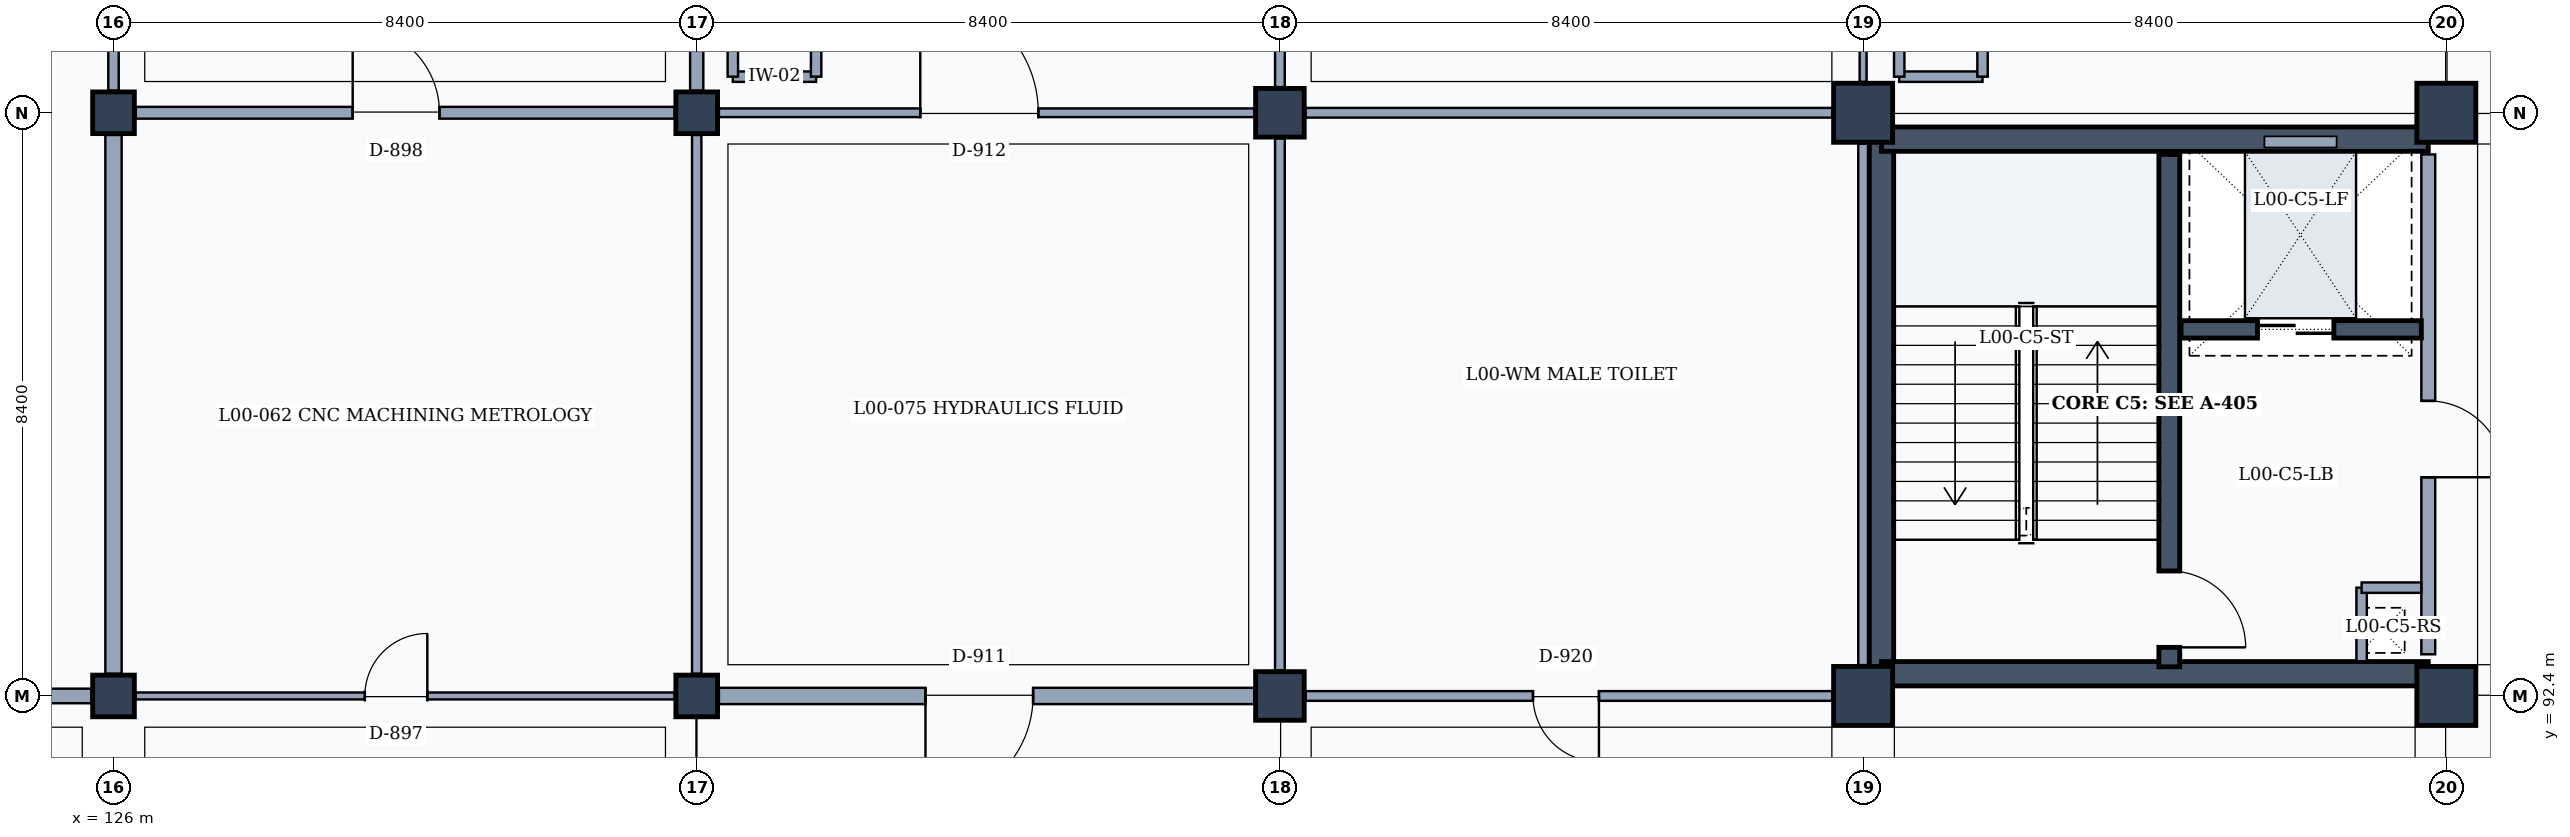
"""IFC4 building model, lengths in metres.
Left out: names, types, materials, properties, quantities, classifications, styles, units other than length and angle.
Written with IfcOpenShell. Run it as: python <this file> out.ifc"""

import sys

from ifc_helpers import new_model, si_unit, direction, frame, frame_2d, origin, origin_2d, place, context, subcontext, project, spatial, rectangle, extrude, element, fill, save


model = new_model("IFC4")
c1 = context("Model", 3, precision=1e-05, world=origin(), true_north=direction((0.0, 1.0)))
c2 = subcontext(c1, "Body", "Model", "MODEL_VIEW")
j1 = project(units=[si_unit("LENGTHUNIT", "METRE"), si_unit("PLANEANGLEUNIT", "RADIAN")], contexts=[c1])
p1 = place(None, origin())
s1 = spatial("IfcSite", under=j1, at=p1, CompositionType="ELEMENT")
p2 = place(p1, origin())
s2 = spatial("IfcBuilding", under=s1, at=p2, CompositionType="ELEMENT")
p3 = place(p2, origin())
s3 = spatial("IfcBuildingStorey", under=s2, at=p3, CompositionType="ELEMENT", Elevation=0.0)
for number, where, z_axis, x_axis in (
    (1, (126.0, 92.4, 0.0), (0.0, 0.0, 1.0), (1.0, 0.0, 0.0)),
    (2, (126.0, 100.8, 0.0), (0.0, 0.0, 1.0), (1.0, 0.0, 0.0)),
    (3, (134.4, 92.4, 0.0), (0.0, 0.0, 1.0), (1.0, 0.0, 0.0)),
    (4, (134.4, 100.8, 0.0), (0.0, 0.0, 1.0), (1.0, 0.0, 0.0)),
):
    element("IfcColumn", number, at=place(p3, frame(where, z_axis=z_axis, x_axis=x_axis)), inside=s3, PredefinedType="COLUMN", context=c2, shape_type="SweptSolid", body=[
        extrude(rectangle(XDim=0.6, YDim=0.6, at=origin_2d()), origin(), (0.0, 0.0, 1.0), 4.8),
    ])
for number, where, z_axis, x_axis in (
    (5, (142.8, 92.4, 0.0), (0.0, 0.0, 1.0), (1.0, 0.0, 0.0)),
    (6, (142.8, 100.8, 0.0), (0.0, 0.0, 1.0), (1.0, 0.0, 0.0)),
):
    element("IfcColumn", number, at=place(p3, frame(where, z_axis=z_axis, x_axis=x_axis)), inside=s3, PredefinedType="COLUMN", context=c2, shape_type="SweptSolid", body=[
        extrude(rectangle(XDim=0.7, YDim=0.7, at=origin_2d()), origin(), (0.0, 0.0, 1.0), 4.8),
    ])
for number, where, z_axis, x_axis in (
    (7, (151.2, 92.4, 0.0), (0.0, 0.0, 1.0), (1.0, 0.0, 0.0)),
    (8, (151.2, 100.8, 0.0), (0.0, 0.0, 1.0), (1.0, 0.0, 0.0)),
    (9, (159.6, 92.4, 0.0), (0.0, 0.0, 1.0), (1.0, 0.0, 0.0)),
    (10, (159.6, 100.8, 0.0), (0.0, 0.0, 1.0), (1.0, 0.0, 0.0)),
):
    element("IfcColumn", number, at=place(p3, frame(where, z_axis=z_axis, x_axis=x_axis)), inside=s3, PredefinedType="COLUMN", context=c2, shape_type="SweptSolid", body=[
        extrude(rectangle(XDim=0.85, YDim=0.85, at=origin_2d()), origin(), (0.0, 0.0, 1.0), 4.8),
    ])
p4 = place(p3, frame((151.465, 92.65, 0.0), z_axis=(0.0, 0.0, 1.0), x_axis=(0.0, 1.0, 0.0)))
e11 = element("IfcWall", 11, at=p4, inside=s3, PredefinedType="SHEAR", context=c2, shape_type="SweptSolid", body=[
    extrude(rectangle(XDim=7.94, YDim=0.35, at=frame_2d((3.97, 0.0))), origin(), (0.0, 0.0, 1.0), 4.55),
])
p5 = place(p3, frame((151.465, 100.42, 0.0), z_axis=(0.0, 0.0, 1.0), x_axis=(1.0, 0.0, 0.0)))
e12 = element("IfcWall", 12, at=p5, inside=s3, PredefinedType="SHEAR", context=c2, shape_type="SweptSolid", body=[
    extrude(rectangle(XDim=7.875, YDim=0.35, at=frame_2d((3.938, 0.0))), origin(), (0.0, 0.0, 1.0), 4.55),
])
p6 = place(p3, frame((159.34, 100.2, 0.0), z_axis=(0.0, 0.0, 1.0), x_axis=(0.0, -1.0, 0.0)))
e13 = element("IfcWall", 13, at=p6, inside=s3, PredefinedType="PARTITIONING", context=c2, shape_type="SweptSolid", body=[
    extrude(rectangle(XDim=7.2, YDim=0.2, at=frame_2d((3.6, 0.0))), origin(), (0.0, 0.0, 1.0), 3.92),
])
p7 = place(p6, frame((3.55, 0.0, 0.0)))
e14 = element("IfcOpeningElement", 14, at=p7, cuts=e13, PredefinedType="OPENING", context=c2, shape_type="SweptSolid", body=[
    extrude(rectangle(XDim=1.1, YDim=2.15, at=frame_2d((0.55, 1.075))), frame((0.0, 0.11, 0.0), z_axis=(0.0, -1.0, 0.0), x_axis=(1.0, 0.0, 0.0)), (0.0, 0.0, 1.0), 0.22),
])
p8 = place(p3, frame((159.34, 92.72, 0.0), z_axis=(0.0, 0.0, 1.0), x_axis=(-1.0, 0.0, 0.0)))
e15 = element("IfcWall", 15, at=p8, inside=s3, PredefinedType="SHEAR", context=c2, shape_type="SweptSolid", body=[
    extrude(rectangle(XDim=7.875, YDim=0.35, at=frame_2d((3.938, 0.0))), origin(), (0.0, 0.0, 1.0), 4.55),
])
p9 = place(p3, frame((155.61, 92.82, 0.0), z_axis=(0.0, 0.0, 1.0), x_axis=(0.0, 1.0, 0.0)))
e16 = element("IfcWall", 16, at=p9, inside=s3, PredefinedType="SHEAR", context=c2, shape_type="SweptSolid", body=[
    extrude(rectangle(XDim=7.38, YDim=0.3, at=frame_2d((3.69, 0.0))), origin(), (0.0, 0.0, 1.0), 4.55),
])
p10 = place(p9, frame((0.28, 0.0, 0.0)))
e17 = element("IfcOpeningElement", 17, at=p10, cuts=e16, PredefinedType="OPENING", context=c2, shape_type="SweptSolid", body=[
    extrude(rectangle(XDim=1.1, YDim=2.15, at=frame_2d((0.55, 1.075))), frame((0.0, 0.16, 0.0), z_axis=(0.0, -1.0, 0.0), x_axis=(1.0, 0.0, 0.0)), (0.0, 0.0, 1.0), 0.32),
])
p11 = place(p3, frame((158.38, 93.96, 0.0), z_axis=(0.0, 0.0, 1.0), x_axis=(0.0, -1.0, 0.0)))
e18 = element("IfcWall", 18, at=p11, inside=s3, PredefinedType="PARTITIONING", context=c2, shape_type="SweptSolid", body=[
    extrude(rectangle(XDim=1.06, YDim=0.15, at=frame_2d((0.53, 0.0))), origin(), (0.0, 0.0, 1.0), 3.92),
])
p12 = place(p3, frame((158.38, 93.96, 0.0), z_axis=(0.0, 0.0, 1.0), x_axis=(1.0, 0.0, 0.0)))
e19 = element("IfcWall", 19, at=p12, inside=s3, PredefinedType="PARTITIONING", context=c2, shape_type="SweptSolid", body=[
    extrude(rectangle(XDim=0.86, YDim=0.15, at=frame_2d((0.43, 0.0))), origin(), (0.0, 0.0, 1.0), 3.92),
])
p13 = place(p3, frame((155.78, 97.68, 0.0), z_axis=(0.0, 0.0, 1.0), x_axis=(1.0, 0.0, 0.0)))
e20 = element("IfcWall", 20, at=p13, inside=s3, PredefinedType="SHEAR", context=c2, shape_type="SweptSolid", body=[
    extrude(rectangle(XDim=3.46, YDim=0.25, at=frame_2d((1.73, 0.0))), origin(), (0.0, 0.0, 1.0), 4.55),
])
p14 = place(p13, frame((1.1, 0.0, 0.0)))
e21 = element("IfcOpeningElement", 21, at=p14, cuts=e20, PredefinedType="OPENING", context=c2, shape_type="SweptSolid", body=[
    extrude(rectangle(XDim=1.1, YDim=2.15, at=frame_2d((0.55, 1.075))), frame((0.0, 0.135, 0.0), z_axis=(0.0, -1.0, 0.0), x_axis=(1.0, 0.0, 0.0)), (0.0, 0.0, 1.0), 0.27),
])
p15 = place(p3, frame((134.92, 101.32, 0.0), z_axis=(0.0, 0.0, 1.0), x_axis=(1.0, 0.0, 0.0)))
e22 = element("IfcWall", 22, at=p15, inside=s3, PredefinedType="PARTITIONING", context=c2, shape_type="SweptSolid", body=[
    extrude(rectangle(XDim=1.2, YDim=0.15, at=frame_2d((0.6, 0.0))), origin(), (0.0, 0.0, 1.0), 4.55),
])
for number, where, z_axis, x_axis in (
    (23, (136.12, 101.32, 0.0), (0.0, 0.0, 1.0), (0.0, 1.0, 0.0)),
    (24, (134.92, 102.52, 0.0), (0.0, 0.0, 1.0), (0.0, -1.0, 0.0)),
    (25, (151.72, 101.32, 0.0), (0.0, 0.0, 1.0), (1.0, 0.0, 0.0)),
    (26, (152.92, 101.32, 0.0), (0.0, 0.0, 1.0), (0.0, 1.0, 0.0)),
    (27, (151.72, 102.52, 0.0), (0.0, 0.0, 1.0), (0.0, -1.0, 0.0)),
):
    element("IfcWall", number, at=place(p3, frame(where, z_axis=z_axis, x_axis=x_axis)), inside=s3, PredefinedType="PARTITIONING", context=c2, shape_type="SweptSolid", body=[
        extrude(rectangle(XDim=1.2, YDim=0.15, at=frame_2d((0.6, 0.0))), origin(), (0.0, 0.0, 1.0), 4.55),
    ])
p16 = place(p3, frame((117.92, 92.4, 0.0), z_axis=(0.0, 0.0, 1.0), x_axis=(1.0, 0.0, 0.0)))
e28 = element("IfcWall", 28, at=p16, inside=s3, PredefinedType="PARTITIONING", context=c2, shape_type="SweptSolid", body=[
    extrude(rectangle(XDim=7.76, YDim=0.21, at=frame_2d((3.88, 0.0))), origin(), (0.0, 0.0, 1.0), 3.92),
])
p17 = place(p16, frame((2.85, 0.0, 0.0)))
e29 = element("IfcOpeningElement", 29, at=p17, cuts=e28, PredefinedType="OPENING", context=c2, shape_type="SweptSolid", body=[
    extrude(rectangle(XDim=1.8, YDim=2.3, at=frame_2d((0.9, 1.15))), frame((0.0, 0.115, 0.0), z_axis=(0.0, -1.0, 0.0), x_axis=(1.0, 0.0, 0.0)), (0.0, 0.0, 1.0), 0.23),
])
p18 = place(p3, frame((126.0, 92.72, 0.0), z_axis=(0.0, 0.0, 1.0), x_axis=(0.0, 1.0, 0.0)))
e30 = element("IfcWall", 30, at=p18, inside=s3, PredefinedType="PARTITIONING", context=c2, shape_type="SweptSolid", body=[
    extrude(rectangle(XDim=7.76, YDim=0.235, at=frame_2d((3.88, 0.0))), origin(), (0.0, 0.0, 1.0), 3.92),
])
p19 = place(p3, frame((126.0, 101.12, 0.0), z_axis=(0.0, 0.0, 1.0), x_axis=(0.0, 1.0, 0.0)))
e31 = element("IfcWall", 31, at=p19, inside=s3, PredefinedType="PARTITIONING", context=c2, shape_type="SweptSolid", body=[
    extrude(rectangle(XDim=7.76, YDim=0.15, at=frame_2d((3.88, 0.0))), origin(), (0.0, 0.0, 1.0), 3.92),
])
p20 = place(p3, frame((126.32, 92.4, 0.0), z_axis=(0.0, 0.0, 1.0), x_axis=(1.0, 0.0, 0.0)))
e32 = element("IfcWall", 32, at=p20, inside=s3, PredefinedType="MOVABLE", context=c2, shape_type="SweptSolid", body=[
    extrude(rectangle(XDim=7.76, YDim=0.1, at=frame_2d((3.88, 0.0))), origin(), (0.0, 0.0, 1.0), 3.92),
])
p21 = place(p20, frame((3.3, 0.0, 0.0)))
e33 = element("IfcOpeningElement", 33, at=p21, cuts=e32, PredefinedType="OPENING", context=c2, shape_type="SweptSolid", body=[
    extrude(rectangle(XDim=0.9, YDim=2.1, at=frame_2d((0.45, 1.05))), frame((0.0, 0.06, 0.0), z_axis=(0.0, -1.0, 0.0), x_axis=(1.0, 0.0, 0.0)), (0.0, 0.0, 1.0), 0.12),
])
p22 = place(p3, frame((134.4, 92.72, 0.0), z_axis=(0.0, 0.0, 1.0), x_axis=(0.0, 1.0, 0.0)))
e34 = element("IfcWall", 34, at=p22, inside=s3, PredefinedType="PARTITIONING", context=c2, shape_type="SweptSolid", body=[
    extrude(rectangle(XDim=7.76, YDim=0.135, at=frame_2d((3.88, 0.0))), origin(), (0.0, 0.0, 1.0), 3.92),
])
p23 = place(p3, frame((126.32, 100.8, 0.0), z_axis=(0.0, 0.0, 1.0), x_axis=(1.0, 0.0, 0.0)))
e35 = element("IfcWall", 35, at=p23, inside=s3, PredefinedType="PARTITIONING", context=c2, shape_type="SweptSolid", body=[
    extrude(rectangle(XDim=7.76, YDim=0.17, at=frame_2d((3.88, 0.0))), origin(), (0.0, 0.0, 1.0), 3.92),
])
p24 = place(p23, frame((3.125, 0.0, 0.0)))
e36 = element("IfcOpeningElement", 36, at=p24, cuts=e35, PredefinedType="OPENING", context=c2, shape_type="SweptSolid", body=[
    extrude(rectangle(XDim=1.25, YDim=2.3, at=frame_2d((0.625, 1.15))), frame((0.0, 0.095, 0.0), z_axis=(0.0, -1.0, 0.0), x_axis=(1.0, 0.0, 0.0)), (0.0, 0.0, 1.0), 0.19),
])
p25 = place(p3, frame((134.4, 101.12, 0.0), z_axis=(0.0, 0.0, 1.0), x_axis=(0.0, 1.0, 0.0)))
e37 = element("IfcWall", 37, at=p25, inside=s3, PredefinedType="PARTITIONING", context=c2, shape_type="SweptSolid", body=[
    extrude(rectangle(XDim=7.76, YDim=0.19, at=frame_2d((3.88, 0.0))), origin(), (0.0, 0.0, 1.0), 3.92),
])
p26 = place(p3, frame((134.72, 92.4, 0.0), z_axis=(0.0, 0.0, 1.0), x_axis=(1.0, 0.0, 0.0)))
e38 = element("IfcWall", 38, at=p26, inside=s3, PredefinedType="PARTITIONING", context=c2, shape_type="SweptSolid", body=[
    extrude(rectangle(XDim=7.71, YDim=0.235, at=frame_2d((3.855, 0.0))), origin(), (0.0, 0.0, 1.0), 3.86),
])
p27 = place(p26, frame((2.975, 0.0, 0.0)))
e39 = element("IfcOpeningElement", 39, at=p27, cuts=e38, PredefinedType="OPENING", context=c2, shape_type="SweptSolid", body=[
    extrude(rectangle(XDim=1.55, YDim=2.35, at=frame_2d((0.775, 1.175))), frame((0.0, 0.127, 0.0), z_axis=(0.0, -1.0, 0.0), x_axis=(1.0, 0.0, 0.0)), (0.0, 0.0, 1.0), 0.255),
])
p28 = place(p3, frame((142.8, 92.77, 0.0), z_axis=(0.0, 0.0, 1.0), x_axis=(0.0, 1.0, 0.0)))
e40 = element("IfcWall", 40, at=p28, inside=s3, PredefinedType="PARTITIONING", context=c2, shape_type="SweptSolid", body=[
    extrude(rectangle(XDim=7.66, YDim=0.14, at=frame_2d((3.83, 0.0))), origin(), (0.0, 0.0, 1.0), 3.92),
])
p29 = place(p3, frame((134.72, 100.8, 0.0), z_axis=(0.0, 0.0, 1.0), x_axis=(1.0, 0.0, 0.0)))
e41 = element("IfcWall", 41, at=p29, inside=s3, PredefinedType="PARTITIONING", context=c2, shape_type="SweptSolid", body=[
    extrude(rectangle(XDim=7.71, YDim=0.125, at=frame_2d((3.855, 0.0))), origin(), (0.0, 0.0, 1.0), 3.86),
])
p30 = place(p29, frame((2.9, 0.0, 0.0)))
e42 = element("IfcOpeningElement", 42, at=p30, cuts=e41, PredefinedType="OPENING", context=c2, shape_type="SweptSolid", body=[
    extrude(rectangle(XDim=1.7, YDim=2.3, at=frame_2d((0.85, 1.15))), frame((0.0, 0.073, 0.0), z_axis=(0.0, -1.0, 0.0), x_axis=(1.0, 0.0, 0.0)), (0.0, 0.0, 1.0), 0.145),
])
p31 = place(p3, frame((142.8, 101.17, 0.0), z_axis=(0.0, 0.0, 1.0), x_axis=(0.0, 1.0, 0.0)))
e43 = element("IfcWall", 43, at=p31, inside=s3, PredefinedType="PARTITIONING", context=c2, shape_type="SweptSolid", body=[
    extrude(rectangle(XDim=7.66, YDim=0.14, at=frame_2d((3.83, 0.0))), origin(), (0.0, 0.0, 1.0), 3.92),
])
p32 = place(p3, frame((143.17, 92.4, 0.0), z_axis=(0.0, 0.0, 1.0), x_axis=(1.0, 0.0, 0.0)))
e44 = element("IfcWall", 44, at=p32, inside=s3, PredefinedType="PARTITIONING", context=c2, shape_type="SweptSolid", body=[
    extrude(rectangle(XDim=7.585, YDim=0.14, at=frame_2d((3.792, 0.0))), origin(), (0.0, 0.0, 1.0), 3.87),
])
p33 = place(p32, frame((3.275, 0.0, 0.0)))
e45 = element("IfcOpeningElement", 45, at=p33, cuts=e44, PredefinedType="OPENING", context=c2, shape_type="SweptSolid", body=[
    extrude(rectangle(XDim=0.95, YDim=2.15, at=frame_2d((0.475, 1.075))), frame((0.0, 0.08, 0.0), z_axis=(0.0, -1.0, 0.0), x_axis=(1.0, 0.0, 0.0)), (0.0, 0.0, 1.0), 0.16),
])
p34 = place(p3, frame((151.2, 92.845, 0.0), z_axis=(0.0, 0.0, 1.0), x_axis=(0.0, 1.0, 0.0)))
e46 = element("IfcWall", 46, at=p34, inside=s3, PredefinedType="PARTITIONING", context=c2, shape_type="SweptSolid", body=[
    extrude(rectangle(XDim=7.51, YDim=0.14, at=frame_2d((3.755, 0.0))), origin(), (0.0, 0.0, 1.0), 3.92),
])
p35 = place(p3, frame((143.17, 100.8, 0.0), z_axis=(0.0, 0.0, 1.0), x_axis=(1.0, 0.0, 0.0)))
e47 = element("IfcWall", 47, at=p35, inside=s3, PredefinedType="PARTITIONING", context=c2, shape_type="SweptSolid", body=[
    extrude(rectangle(XDim=7.585, YDim=0.14, at=frame_2d((3.792, 0.0))), origin(), (0.0, 0.0, 1.0), 3.87),
])
p36 = place(p3, frame((151.2, 101.245, 0.0), z_axis=(0.0, 0.0, 1.0), x_axis=(0.0, 1.0, 0.0)))
e48 = element("IfcWall", 48, at=p36, inside=s3, PredefinedType="MOVABLE", context=c2, shape_type="SweptSolid", body=[
    extrude(rectangle(XDim=7.585, YDim=0.1, at=frame_2d((3.792, 0.0))), origin(), (0.0, 0.0, 1.0), 3.92),
])
p37 = place(p36, frame((3.15, 0.0, 0.0)))
e49 = element("IfcOpeningElement", 49, at=p37, cuts=e48, PredefinedType="OPENING", context=c2, shape_type="SweptSolid", body=[
    extrude(rectangle(XDim=1.2, YDim=2.2, at=frame_2d((0.6, 1.1))), frame((0.0, 0.06, 0.0), z_axis=(0.0, -1.0, 0.0), x_axis=(1.0, 0.0, 0.0)), (0.0, 0.0, 1.0), 0.12),
])
p38 = place(p7, origin())
e50 = element("IfcDoor", 50, at=p38, inside=s3, OperationType="SINGLE_SWING_RIGHT", PredefinedType="DOOR", context=c2, shape_type="SweptSolid", body=[
    extrude(rectangle(XDim=1.1, YDim=2.15, at=frame_2d((0.55, 1.075))), frame((0.0, 0.025, 0.0), z_axis=(0.0, -1.0, 0.0), x_axis=(1.0, 0.0, 0.0)), (0.0, 0.0, 1.0), 0.05),
])
fill(e14, e50)
p39 = place(p10, frame((1.1, 0.0, 0.0), z_axis=(0.0, 0.0, 1.0), x_axis=(-1.0, 0.0, 0.0)))
e51 = element("IfcDoor", 51, at=p39, inside=s3, OperationType="SINGLE_SWING_RIGHT", PredefinedType="DOOR", context=c2, shape_type="SweptSolid", body=[
    extrude(rectangle(XDim=1.1, YDim=2.15, at=frame_2d((0.55, 1.075))), frame((0.0, 0.025, 0.0), z_axis=(0.0, -1.0, 0.0), x_axis=(1.0, 0.0, 0.0)), (0.0, 0.0, 1.0), 0.05),
])
fill(e17, e51)
p40 = place(p14, origin())
e52 = element("IfcDoor", 52, at=p40, inside=s3, OperationType="DOUBLE_DOOR_SLIDING", PredefinedType="DOOR", context=c2, shape_type="SweptSolid", body=[
    extrude(rectangle(XDim=1.1, YDim=2.15, at=frame_2d((0.55, 1.075))), frame((0.0, 0.025, 0.0), z_axis=(0.0, -1.0, 0.0), x_axis=(1.0, 0.0, 0.0)), (0.0, 0.0, 1.0), 0.05),
])
fill(e21, e52)
p41 = place(p21, origin())
e53 = element("IfcDoor", 53, at=p41, inside=s3, OperationType="SINGLE_SWING_RIGHT", PredefinedType="DOOR", context=c2, shape_type="SweptSolid", body=[
    extrude(rectangle(XDim=0.9, YDim=2.1, at=frame_2d((0.45, 1.05))), frame((0.0, 0.025, 0.0), z_axis=(0.0, -1.0, 0.0), x_axis=(1.0, 0.0, 0.0)), (0.0, 0.0, 1.0), 0.05),
])
fill(e33, e53)
p42 = place(p24, origin())
e54 = element("IfcDoor", 54, at=p42, inside=s3, OperationType="SINGLE_SWING_LEFT", PredefinedType="DOOR", context=c2, shape_type="SweptSolid", body=[
    extrude(rectangle(XDim=1.25, YDim=2.3, at=frame_2d((0.625, 1.15))), frame((0.0, 0.025, 0.0), z_axis=(0.0, -1.0, 0.0), x_axis=(1.0, 0.0, 0.0)), (0.0, 0.0, 1.0), 0.05),
])
fill(e36, e54)
p43 = place(p27, frame((1.55, 0.0, 0.0), z_axis=(0.0, 0.0, 1.0), x_axis=(-1.0, 0.0, 0.0)))
e55 = element("IfcDoor", 55, at=p43, inside=s3, OperationType="SINGLE_SWING_RIGHT", PredefinedType="DOOR", context=c2, shape_type="SweptSolid", body=[
    extrude(rectangle(XDim=1.55, YDim=2.35, at=frame_2d((0.775, 1.175))), frame((0.0, 0.025, 0.0), z_axis=(0.0, -1.0, 0.0), x_axis=(1.0, 0.0, 0.0)), (0.0, 0.0, 1.0), 0.05),
])
fill(e39, e55)
p44 = place(p30, origin())
e56 = element("IfcDoor", 56, at=p44, inside=s3, OperationType="SINGLE_SWING_LEFT", PredefinedType="DOOR", context=c2, shape_type="SweptSolid", body=[
    extrude(rectangle(XDim=1.7, YDim=2.3, at=frame_2d((0.85, 1.15))), frame((0.0, 0.025, 0.0), z_axis=(0.0, -1.0, 0.0), x_axis=(1.0, 0.0, 0.0)), (0.0, 0.0, 1.0), 0.05),
])
fill(e42, e56)
p45 = place(p33, frame((0.95, 0.0, 0.0), z_axis=(0.0, 0.0, 1.0), x_axis=(-1.0, 0.0, 0.0)))
e57 = element("IfcDoor", 57, at=p45, inside=s3, OperationType="SINGLE_SWING_LEFT", PredefinedType="DOOR", context=c2, shape_type="SweptSolid", body=[
    extrude(rectangle(XDim=0.95, YDim=2.15, at=frame_2d((0.475, 1.075))), frame((0.0, 0.025, 0.0), z_axis=(0.0, -1.0, 0.0), x_axis=(1.0, 0.0, 0.0)), (0.0, 0.0, 1.0), 0.05),
])
fill(e45, e57)
save(model, sys.argv[1])
